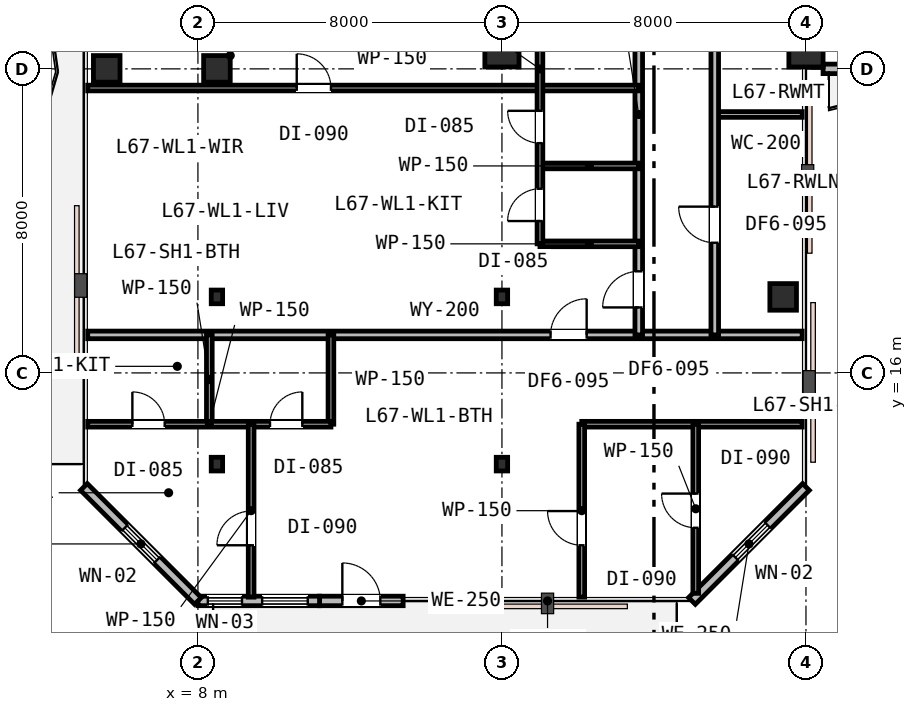
"""IFC4 building model, lengths in metres.
Left out: names, types, materials, properties, quantities, classifications, styles, units other than length and angle.
Written with IfcOpenShell. Run it as: python <this file> out.ifc"""

import sys

from ifc_helpers import new_model, si_unit, direction, frame, frame_2d, origin, origin_2d, place, context, subcontext, project, spatial, rectangle, i_section, extrude, element, fill, save


model = new_model("IFC4")
c1 = context("Model", 3, precision=1e-05, world=origin(), true_north=direction((0.0, 1.0)))
c2 = subcontext(c1, "Body", "Model", "MODEL_VIEW")
j1 = project(units=[si_unit("LENGTHUNIT", "METRE"), si_unit("PLANEANGLEUNIT", "RADIAN")], contexts=[c1])
p1 = place(None, origin())
s1 = spatial("IfcSite", under=j1, at=p1, CompositionType="ELEMENT")
p2 = place(p1, origin())
s2 = spatial("IfcBuilding", under=s1, at=p2, CompositionType="ELEMENT")
p3 = place(p2, frame((0.0, 0.0, 260.2)))
s3 = spatial("IfcBuildingStorey", under=s2, at=p3, CompositionType="ELEMENT", Elevation=260.2)
p4 = place(p3, frame((8.5, 24.0, 0.0), z_axis=(0.0, 0.0, 1.0), x_axis=(1.0, 0.0, 0.0)))
e1 = element("IfcColumn", 1, at=p4, inside=s3, PredefinedType="COLUMN", context=c2, shape_type="SweptSolid", body=[
    extrude(rectangle(XDim=0.7, YDim=0.7, at=origin_2d()), origin(), (0.0, 0.0, 1.0), 3.8),
])
for number, where, z_axis, x_axis in (
    (2, (16.0, 24.5, 0.0), (0.0, 0.0, 1.0), (1.0, 0.0, 0.0)),
    (3, (24.0, 24.5, 0.0), (0.0, 0.0, 1.0), (1.0, 0.0, 0.0)),
):
    element("IfcColumn", number, at=place(p3, frame(where, z_axis=z_axis, x_axis=x_axis)), inside=s3, PredefinedType="COLUMN", context=c2, shape_type="SweptSolid", body=[
        extrude(rectangle(XDim=0.9, YDim=0.9, at=origin_2d()), origin(), (0.0, 0.0, 1.0), 3.8),
    ])
for number, where, z_axis, x_axis in (
    (4, (5.6, 24.0, 0.0), (0.0, 0.0, 1.0), (1.0, 0.0, 0.0)),
    (5, (23.4, 18.0, 0.0), (0.0, 0.0, 1.0), (1.0, 0.0, 0.0)),
):
    element("IfcColumn", number, at=place(p3, frame(where, z_axis=z_axis, x_axis=x_axis)), inside=s3, PredefinedType="COLUMN", context=c2, shape_type="SweptSolid", body=[
        extrude(rectangle(XDim=0.7, YDim=0.7, at=origin_2d()), origin(), (0.0, 0.0, 1.0), 3.8),
    ])
for number, where, z_axis, x_axis in (
    (6, (8.5, 13.6, 0.0), (0.0, 0.0, 1.0), (1.0, 0.0, 0.0)),
    (7, (16.0, 13.6, 0.0), (0.0, 0.0, 1.0), (1.0, 0.0, 0.0)),
    (8, (8.5, 18.0, 0.0), (0.0, 0.0, 1.0), (1.0, 0.0, 0.0)),
    (9, (16.0, 18.0, 0.0), (0.0, 0.0, 1.0), (1.0, 0.0, 0.0)),
):
    element("IfcColumn", number, at=place(p3, frame(where, z_axis=z_axis, x_axis=x_axis)), inside=s3, PredefinedType="COLUMN", context=c2, shape_type="SweptSolid", body=[
        extrude(i_section(OverallWidth=0.3, OverallDepth=0.36, WebThickness=0.013, FlangeThickness=0.022, FilletRadius=0.027, at=origin_2d()), origin(), (0.0, 0.0, 1.0), 3.8),
    ])
p5 = place(p3, frame((11.2, 10.0, 0.0), z_axis=(0.0, 0.0, 1.0), x_axis=(1.0, 0.0, 0.0)))
e10 = element("IfcWall", 10, at=p5, inside=s3, PredefinedType="STANDARD", context=c2, shape_type="SweptSolid", body=[
    extrude(rectangle(XDim=2.2, YDim=0.25, at=frame_2d((1.1, 0.0))), origin(), (0.0, 0.0, 1.0), 3.53),
])
p6 = place(p5, frame((0.6, 0.0, 0.0)))
e11 = element("IfcOpeningElement", 11, at=p6, cuts=e10, PredefinedType="OPENING", context=c2, shape_type="SweptSolid", body=[
    extrude(rectangle(XDim=1.0, YDim=2.15, at=frame_2d((0.5, 1.075))), frame((0.0, 0.135, 0.0), z_axis=(0.0, -1.0, 0.0), x_axis=(1.0, 0.0, 0.0)), (0.0, 0.0, 1.0), 0.27),
])
p7 = place(p3, frame((8.0, 10.0, 0.0), z_axis=(0.0, 0.0, 1.0), x_axis=(1.0, 0.0, 0.0)))
e12 = element("IfcWall", 12, at=p7, inside=s3, PredefinedType="STANDARD", context=c2, shape_type="SweptSolid", body=[
    extrude(rectangle(XDim=3.2, YDim=0.25, at=frame_2d((1.6, 0.0))), origin(), (0.0, 0.0, 1.0), 3.53),
])
p8 = place(p7, frame((0.26, 0.0, 0.9)))
e13 = element("IfcOpeningElement", 13, at=p8, cuts=e12, PredefinedType="OPENING", context=c2, shape_type="SweptSolid", body=[
    extrude(rectangle(XDim=0.9, YDim=1.55, at=frame_2d((0.45, 0.775))), frame((0.0, 0.135, 0.0), z_axis=(0.0, -1.0, 0.0), x_axis=(1.0, 0.0, 0.0)), (0.0, 0.0, 1.0), 0.27),
])
p9 = place(p7, frame((1.69, 0.0, 0.85)))
e14 = element("IfcOpeningElement", 14, at=p9, cuts=e12, PredefinedType="OPENING", context=c2, shape_type="SweptSolid", body=[
    extrude(rectangle(XDim=1.2, YDim=1.6, at=frame_2d((0.6, 0.8))), frame((0.0, 0.135, 0.0), z_axis=(0.0, -1.0, 0.0), x_axis=(1.0, 0.0, 0.0)), (0.0, 0.0, 1.0), 0.27),
])
p10 = place(p3, frame((21.0, 10.0, 0.0), z_axis=(0.0, 0.0, 1.0), x_axis=(0.707106781187, 0.707106781187, 0.0)))
e15 = element("IfcWall", 15, at=p10, inside=s3, PredefinedType="STANDARD", context=c2, shape_type="SweptSolid", body=[
    extrude(rectangle(XDim=4.243, YDim=0.25, at=frame_2d((2.121, 0.0))), origin(), (0.0, 0.0, 1.0), 3.53),
])
p11 = place(p10, frame((1.617, 0.0, 0.85)))
e16 = element("IfcOpeningElement", 16, at=p11, cuts=e15, PredefinedType="OPENING", context=c2, shape_type="SweptSolid", body=[
    extrude(rectangle(XDim=1.2, YDim=1.6, at=frame_2d((0.6, 0.8))), frame((0.0, 0.135, 0.0), z_axis=(0.0, -1.0, 0.0), x_axis=(1.0, 0.0, 0.0)), (0.0, 0.0, 1.0), 0.27),
])
p12 = place(p3, frame((24.45, 24.0, 0.0), z_axis=(0.0, 0.0, 1.0), x_axis=(1.0, 0.0, 0.0)))
e17 = element("IfcWall", 17, at=p12, inside=s3, PredefinedType="STANDARD", context=c2, shape_type="SweptSolid", body=[
    extrude(rectangle(XDim=0.95, YDim=0.25, at=frame_2d((0.475, 0.0))), origin(), (0.0, 0.0, 1.0), 3.27),
])
p13 = place(p3, frame((5.0, 13.0, 0.0), z_axis=(0.0, 0.0, 1.0), x_axis=(0.707106781187, -0.707106781187, 0.0)))
e18 = element("IfcWall", 18, at=p13, inside=s3, PredefinedType="STANDARD", context=c2, shape_type="SweptSolid", body=[
    extrude(rectangle(XDim=4.243, YDim=0.25, at=frame_2d((2.121, 0.0))), origin(), (0.0, 0.0, 1.0), 3.53),
])
p14 = place(p13, frame((1.521, 0.0, 0.85)))
e19 = element("IfcOpeningElement", 19, at=p14, cuts=e18, PredefinedType="OPENING", context=c2, shape_type="SweptSolid", body=[
    extrude(rectangle(XDim=1.2, YDim=1.6, at=frame_2d((0.6, 0.8))), frame((0.0, 0.135, 0.0), z_axis=(0.0, -1.0, 0.0), x_axis=(1.0, 0.0, 0.0)), (0.0, 0.0, 1.0), 0.27),
])
p15 = place(p3, frame((5.1, 17.0, 0.0), z_axis=(0.0, 0.0, 1.0), x_axis=(1.0, 0.0, 0.0)))
e20 = element("IfcWall", 20, at=p15, inside=s3, PredefinedType="PARTITIONING", context=c2, shape_type="SweptSolid", body=[
    extrude(rectangle(XDim=18.8, YDim=0.2, at=frame_2d((9.4, 0.0))), origin(), (0.0, 0.0, 1.0), 3.16),
])
p16 = place(p15, frame((12.179, 0.0, 0.0)))
e21 = element("IfcOpeningElement", 21, at=p16, cuts=e20, PredefinedType="OPENING", context=c2, shape_type="SweptSolid", body=[
    extrude(rectangle(XDim=0.95, YDim=2.15, at=frame_2d((0.475, 1.075))), frame((0.0, 0.11, 0.0), z_axis=(0.0, -1.0, 0.0), x_axis=(1.0, 0.0, 0.0)), (0.0, 0.0, 1.0), 0.22),
])
p17 = place(p3, frame((19.6, 17.0, 0.0), z_axis=(0.0, 0.0, 1.0), x_axis=(0.0, 1.0, 0.0)))
e22 = element("IfcWall", 22, at=p17, inside=s3, PredefinedType="PARTITIONING", context=c2, shape_type="SweptSolid", body=[
    extrude(rectangle(XDim=11.6, YDim=0.2, at=frame_2d((5.8, 0.0))), origin(), (0.0, 0.0, 1.0), 3.16),
])
p18 = place(p17, frame((0.723, 0.0, 0.0)))
e23 = element("IfcOpeningElement", 23, at=p18, cuts=e22, PredefinedType="OPENING", context=c2, shape_type="SweptSolid", body=[
    extrude(rectangle(XDim=0.95, YDim=2.15, at=frame_2d((0.475, 1.075))), frame((0.0, 0.11, 0.0), z_axis=(0.0, -1.0, 0.0), x_axis=(1.0, 0.0, 0.0)), (0.0, 0.0, 1.0), 0.22),
])
for number, where, z_axis, x_axis in (
    (24, (17.0, 19.396, 0.0), (0.0, 0.0, 1.0), (1.0, 0.0, 0.0)),
    (25, (17.0, 21.446, 0.0), (0.0, 0.0, 1.0), (1.0, 0.0, 0.0)),
):
    element("IfcWall", number, at=place(p3, frame(where, z_axis=z_axis, x_axis=x_axis)), inside=s3, PredefinedType="PARTITIONING", context=c2, shape_type="SweptSolid", body=[
        extrude(rectangle(XDim=2.6, YDim=0.15, at=frame_2d((1.3, 0.0))), origin(), (0.0, 0.0, 1.0), 3.53),
    ])
p19 = place(p3, frame((5.1, 23.496, 0.0), z_axis=(0.0, 0.0, 1.0), x_axis=(1.0, 0.0, 0.0)))
e26 = element("IfcWall", 26, at=p19, inside=s3, PredefinedType="PARTITIONING", context=c2, shape_type="SweptSolid", body=[
    extrude(rectangle(XDim=14.5, YDim=0.15, at=frame_2d((7.25, 0.0))), origin(), (0.0, 0.0, 1.0), 3.16),
])
p20 = place(p19, frame((5.5, 0.0, 0.0)))
e27 = element("IfcOpeningElement", 27, at=p20, cuts=e26, PredefinedType="OPENING", context=c2, shape_type="SweptSolid", body=[
    extrude(rectangle(XDim=0.9, YDim=2.15, at=frame_2d((0.45, 1.075))), frame((0.0, 0.085, 0.0), z_axis=(0.0, -1.0, 0.0), x_axis=(1.0, 0.0, 0.0)), (0.0, 0.0, 1.0), 0.17),
])
p21 = place(p3, frame((17.0, 19.396, 0.0), z_axis=(0.0, 0.0, 1.0), x_axis=(0.0, 1.0, 0.0)))
e28 = element("IfcWall", 28, at=p21, inside=s3, PredefinedType="PARTITIONING", context=c2, shape_type="SweptSolid", body=[
    extrude(rectangle(XDim=9.204, YDim=0.15, at=frame_2d((4.602, 0.0))), origin(), (0.0, 0.0, 1.0), 3.16),
])
p22 = place(p21, frame((0.6, 0.0, 0.0)))
e29 = element("IfcOpeningElement", 29, at=p22, cuts=e28, PredefinedType="OPENING", context=c2, shape_type="SweptSolid", body=[
    extrude(rectangle(XDim=0.85, YDim=2.15, at=frame_2d((0.425, 1.075))), frame((0.0, 0.085, 0.0), z_axis=(0.0, -1.0, 0.0), x_axis=(1.0, 0.0, 0.0)), (0.0, 0.0, 1.0), 0.17),
])
p23 = place(p21, frame((2.65, 0.0, 0.0)))
e30 = element("IfcOpeningElement", 30, at=p23, cuts=e28, PredefinedType="OPENING", context=c2, shape_type="SweptSolid", body=[
    extrude(rectangle(XDim=0.85, YDim=2.15, at=frame_2d((0.425, 1.075))), frame((0.0, 0.085, 0.0), z_axis=(0.0, -1.0, 0.0), x_axis=(1.0, 0.0, 0.0)), (0.0, 0.0, 1.0), 0.17),
])
p24 = place(p21, frame((6.593, 0.0, 0.0)))
e31 = element("IfcOpeningElement", 31, at=p24, cuts=e28, PredefinedType="OPENING", context=c2, shape_type="SweptSolid", body=[
    extrude(rectangle(XDim=0.85, YDim=2.15, at=frame_2d((0.425, 1.075))), frame((0.0, 0.085, 0.0), z_axis=(0.0, -1.0, 0.0), x_axis=(1.0, 0.0, 0.0)), (0.0, 0.0, 1.0), 0.17),
])
p25 = place(p3, frame((21.6, 22.8, 0.0), z_axis=(0.0, 0.0, 1.0), x_axis=(1.0, 0.0, 0.0)))
e32 = element("IfcWall", 32, at=p25, inside=s3, PredefinedType="PARTITIONING", context=c2, shape_type="SweptSolid", body=[
    extrude(rectangle(XDim=2.3, YDim=0.15, at=frame_2d((1.15, 0.0))), origin(), (0.0, 0.0, 1.0), 3.53),
])
p26 = place(p3, frame((21.6, 17.0, 0.0), z_axis=(0.0, 0.0, 1.0), x_axis=(0.0, 1.0, 0.0)))
e33 = element("IfcWall", 33, at=p26, inside=s3, PredefinedType="PARTITIONING", context=c2, shape_type="SweptSolid", body=[
    extrude(rectangle(XDim=11.6, YDim=0.2, at=frame_2d((5.8, 0.0))), origin(), (0.0, 0.0, 1.0), 3.16),
])
p27 = place(p26, frame((8.994, 0.0, 0.0)))
e34 = element("IfcOpeningElement", 34, at=p27, cuts=e33, PredefinedType="OPENING", context=c2, shape_type="SweptSolid", body=[
    extrude(rectangle(XDim=0.95, YDim=2.15, at=frame_2d((0.475, 1.075))), frame((0.0, 0.11, 0.0), z_axis=(0.0, -1.0, 0.0), x_axis=(1.0, 0.0, 0.0)), (0.0, 0.0, 1.0), 0.22),
])
p28 = place(p26, frame((2.425, 0.0, 0.0)))
e35 = element("IfcOpeningElement", 35, at=p28, cuts=e33, PredefinedType="OPENING", context=c2, shape_type="SweptSolid", body=[
    extrude(rectangle(XDim=0.95, YDim=2.15, at=frame_2d((0.475, 1.075))), frame((0.0, 0.11, 0.0), z_axis=(0.0, -1.0, 0.0), x_axis=(1.0, 0.0, 0.0)), (0.0, 0.0, 1.0), 0.22),
])
for number, where, z_axis, x_axis in (
    (36, (11.5, 14.65, 0.0), (0.0, 0.0, 1.0), (0.0, 1.0, 0.0)),
    (37, (8.3, 14.65, 0.0), (0.0, 0.0, 1.0), (0.0, 1.0, 0.0)),
):
    element("IfcWall", number, at=place(p3, frame(where, z_axis=z_axis, x_axis=x_axis)), inside=s3, PredefinedType="PARTITIONING", context=c2, shape_type="SweptSolid", body=[
        extrude(rectangle(XDim=2.35, YDim=0.15, at=frame_2d((1.175, 0.0))), origin(), (0.0, 0.0, 1.0), 3.53),
    ])
p29 = place(p3, frame((5.1, 14.65, 0.0), z_axis=(0.0, 0.0, 1.0), x_axis=(1.0, 0.0, 0.0)))
e38 = element("IfcWall", 38, at=p29, inside=s3, PredefinedType="PARTITIONING", context=c2, shape_type="SweptSolid", body=[
    extrude(rectangle(XDim=6.4, YDim=0.15, at=frame_2d((3.2, 0.0))), origin(), (0.0, 0.0, 1.0), 3.53),
])
p30 = place(p29, frame((1.175, 0.0, 0.0)))
e39 = element("IfcOpeningElement", 39, at=p30, cuts=e38, PredefinedType="OPENING", context=c2, shape_type="SweptSolid", body=[
    extrude(rectangle(XDim=0.85, YDim=2.15, at=frame_2d((0.425, 1.075))), frame((0.0, 0.085, 0.0), z_axis=(0.0, -1.0, 0.0), x_axis=(1.0, 0.0, 0.0)), (0.0, 0.0, 1.0), 0.17),
])
p31 = place(p29, frame((4.797, 0.0, 0.0)))
e40 = element("IfcOpeningElement", 40, at=p31, cuts=e38, PredefinedType="OPENING", context=c2, shape_type="SweptSolid", body=[
    extrude(rectangle(XDim=0.85, YDim=2.15, at=frame_2d((0.425, 1.075))), frame((0.0, 0.085, 0.0), z_axis=(0.0, -1.0, 0.0), x_axis=(1.0, 0.0, 0.0)), (0.0, 0.0, 1.0), 0.17),
])
p32 = place(p3, frame((18.1, 14.65, 0.0), z_axis=(0.0, 0.0, 1.0), x_axis=(1.0, 0.0, 0.0)))
e41 = element("IfcWall", 41, at=p32, inside=s3, PredefinedType="PARTITIONING", context=c2, shape_type="SweptSolid", body=[
    extrude(rectangle(XDim=5.8, YDim=0.15, at=frame_2d((2.9, 0.0))), origin(), (0.0, 0.0, 1.0), 3.53),
])
p33 = place(p3, frame((9.4, 10.1, 0.0), z_axis=(0.0, 0.0, 1.0), x_axis=(0.0, 1.0, 0.0)))
e42 = element("IfcWall", 42, at=p33, inside=s3, PredefinedType="PARTITIONING", context=c2, shape_type="SweptSolid", body=[
    extrude(rectangle(XDim=4.55, YDim=0.15, at=frame_2d((2.275, 0.0))), origin(), (0.0, 0.0, 1.0), 3.53),
])
p34 = place(p33, frame((1.365, 0.0, 0.0)))
e43 = element("IfcOpeningElement", 43, at=p34, cuts=e42, PredefinedType="OPENING", context=c2, shape_type="SweptSolid", body=[
    extrude(rectangle(XDim=0.9, YDim=2.15, at=frame_2d((0.45, 1.075))), frame((0.0, 0.085, 0.0), z_axis=(0.0, -1.0, 0.0), x_axis=(1.0, 0.0, 0.0)), (0.0, 0.0, 1.0), 0.17),
])
p35 = place(p3, frame((21.1, 10.2, 0.0), z_axis=(0.0, 0.0, 1.0), x_axis=(0.0, 1.0, 0.0)))
e44 = element("IfcWall", 44, at=p35, inside=s3, PredefinedType="PARTITIONING", context=c2, shape_type="SweptSolid", body=[
    extrude(rectangle(XDim=4.45, YDim=0.15, at=frame_2d((2.225, 0.0))), origin(), (0.0, 0.0, 1.0), 3.53),
])
p36 = place(p35, frame((1.725, 0.0, 0.0)))
e45 = element("IfcOpeningElement", 45, at=p36, cuts=e44, PredefinedType="OPENING", context=c2, shape_type="SweptSolid", body=[
    extrude(rectangle(XDim=0.9, YDim=2.15, at=frame_2d((0.45, 1.075))), frame((0.0, 0.085, 0.0), z_axis=(0.0, -1.0, 0.0), x_axis=(1.0, 0.0, 0.0)), (0.0, 0.0, 1.0), 0.17),
])
p37 = place(p3, frame((18.1, 10.1, 0.0), z_axis=(0.0, 0.0, 1.0), x_axis=(0.0, 1.0, 0.0)))
e46 = element("IfcWall", 46, at=p37, inside=s3, PredefinedType="PARTITIONING", context=c2, shape_type="SweptSolid", body=[
    extrude(rectangle(XDim=4.55, YDim=0.15, at=frame_2d((2.275, 0.0))), origin(), (0.0, 0.0, 1.0), 3.53),
])
p38 = place(p37, frame((1.365, 0.0, 0.0)))
e47 = element("IfcOpeningElement", 47, at=p38, cuts=e46, PredefinedType="OPENING", context=c2, shape_type="SweptSolid", body=[
    extrude(rectangle(XDim=0.9, YDim=2.15, at=frame_2d((0.45, 1.075))), frame((0.0, 0.085, 0.0), z_axis=(0.0, -1.0, 0.0), x_axis=(1.0, 0.0, 0.0)), (0.0, 0.0, 1.0), 0.17),
])
p39 = place(p6, origin())
e48 = element("IfcDoor", 48, at=p39, inside=s3, OperationType="SINGLE_SWING_LEFT", PredefinedType="DOOR", context=c2, shape_type="SweptSolid", body=[
    extrude(rectangle(XDim=1.0, YDim=2.15, at=frame_2d((0.5, 1.075))), frame((0.0, 0.025, 0.0), z_axis=(0.0, -1.0, 0.0), x_axis=(1.0, 0.0, 0.0)), (0.0, 0.0, 1.0), 0.05),
])
fill(e11, e48)
p40 = place(p8, origin())
e49 = element("IfcWindow", 49, at=p40, inside=s3, PartitioningType="SINGLE_PANEL", PredefinedType="WINDOW", context=c2, shape_type="SweptSolid", body=[
    extrude(rectangle(XDim=0.9, YDim=1.55, at=frame_2d((0.45, 0.775))), frame((0.0, 0.03, 0.0), z_axis=(0.0, -1.0, 0.0), x_axis=(1.0, 0.0, 0.0)), (0.0, 0.0, 1.0), 0.06),
])
fill(e13, e49)
p41 = place(p9, origin())
e50 = element("IfcWindow", 50, at=p41, inside=s3, PartitioningType="SINGLE_PANEL", PredefinedType="WINDOW", context=c2, shape_type="SweptSolid", body=[
    extrude(rectangle(XDim=1.2, YDim=1.6, at=frame_2d((0.6, 0.8))), frame((0.0, 0.03, 0.0), z_axis=(0.0, -1.0, 0.0), x_axis=(1.0, 0.0, 0.0)), (0.0, 0.0, 1.0), 0.06),
])
fill(e14, e50)
p42 = place(p11, origin())
e51 = element("IfcWindow", 51, at=p42, inside=s3, PartitioningType="SINGLE_PANEL", PredefinedType="WINDOW", context=c2, shape_type="SweptSolid", body=[
    extrude(rectangle(XDim=1.2, YDim=1.6, at=frame_2d((0.6, 0.8))), frame((0.0, 0.03, 0.0), z_axis=(0.0, -1.0, 0.0), x_axis=(1.0, 0.0, 0.0)), (0.0, 0.0, 1.0), 0.06),
])
fill(e16, e51)
p43 = place(p14, origin())
e52 = element("IfcWindow", 52, at=p43, inside=s3, PartitioningType="SINGLE_PANEL", PredefinedType="WINDOW", context=c2, shape_type="SweptSolid", body=[
    extrude(rectangle(XDim=1.2, YDim=1.6, at=frame_2d((0.6, 0.8))), frame((0.0, 0.03, 0.0), z_axis=(0.0, -1.0, 0.0), x_axis=(1.0, 0.0, 0.0)), (0.0, 0.0, 1.0), 0.06),
])
fill(e19, e52)
p44 = place(p18, origin())
e53 = element("IfcDoor", 53, at=p44, inside=s3, OperationType="SINGLE_SWING_LEFT", PredefinedType="DOOR", context=c2, shape_type="SweptSolid", body=[
    extrude(rectangle(XDim=0.95, YDim=2.15, at=frame_2d((0.475, 1.075))), frame((0.0, 0.025, 0.0), z_axis=(0.0, -1.0, 0.0), x_axis=(1.0, 0.0, 0.0)), (0.0, 0.0, 1.0), 0.05),
])
fill(e23, e53)
p45 = place(p22, origin())
e54 = element("IfcDoor", 54, at=p45, inside=s3, OperationType="SINGLE_SWING_LEFT", PredefinedType="DOOR", context=c2, shape_type="SweptSolid", body=[
    extrude(rectangle(XDim=0.85, YDim=2.15, at=frame_2d((0.425, 1.075))), frame((0.0, 0.025, 0.0), z_axis=(0.0, -1.0, 0.0), x_axis=(1.0, 0.0, 0.0)), (0.0, 0.0, 1.0), 0.05),
])
fill(e29, e54)
p46 = place(p23, origin())
e55 = element("IfcDoor", 55, at=p46, inside=s3, OperationType="SINGLE_SWING_RIGHT", PredefinedType="DOOR", context=c2, shape_type="SweptSolid", body=[
    extrude(rectangle(XDim=0.85, YDim=2.15, at=frame_2d((0.425, 1.075))), frame((0.0, 0.025, 0.0), z_axis=(0.0, -1.0, 0.0), x_axis=(1.0, 0.0, 0.0)), (0.0, 0.0, 1.0), 0.05),
])
fill(e30, e55)
p47 = place(p20, origin())
e56 = element("IfcDoor", 56, at=p47, inside=s3, OperationType="SINGLE_SWING_LEFT", PredefinedType="DOOR", context=c2, shape_type="SweptSolid", body=[
    extrude(rectangle(XDim=0.9, YDim=2.15, at=frame_2d((0.45, 1.075))), frame((0.0, 0.025, 0.0), z_axis=(0.0, -1.0, 0.0), x_axis=(1.0, 0.0, 0.0)), (0.0, 0.0, 1.0), 0.05),
])
fill(e27, e56)
p48 = place(p28, origin())
e57 = element("IfcDoor", 57, at=p48, inside=s3, OperationType="SINGLE_SWING_RIGHT", PredefinedType="DOOR", context=c2, shape_type="SweptSolid", body=[
    extrude(rectangle(XDim=0.95, YDim=2.15, at=frame_2d((0.475, 1.075))), frame((0.0, 0.025, 0.0), z_axis=(0.0, -1.0, 0.0), x_axis=(1.0, 0.0, 0.0)), (0.0, 0.0, 1.0), 0.05),
])
fill(e35, e57)
p49 = place(p16, origin())
e58 = element("IfcDoor", 58, at=p49, inside=s3, OperationType="SINGLE_SWING_RIGHT", PredefinedType="DOOR", context=c2, shape_type="SweptSolid", body=[
    extrude(rectangle(XDim=0.95, YDim=2.15, at=frame_2d((0.475, 1.075))), frame((0.0, 0.025, 0.0), z_axis=(0.0, -1.0, 0.0), x_axis=(1.0, 0.0, 0.0)), (0.0, 0.0, 1.0), 0.05),
])
fill(e21, e58)
p50 = place(p30, origin())
e59 = element("IfcDoor", 59, at=p50, inside=s3, OperationType="SINGLE_SWING_LEFT", PredefinedType="DOOR", context=c2, shape_type="SweptSolid", body=[
    extrude(rectangle(XDim=0.85, YDim=2.15, at=frame_2d((0.425, 1.075))), frame((0.0, 0.025, 0.0), z_axis=(0.0, -1.0, 0.0), x_axis=(1.0, 0.0, 0.0)), (0.0, 0.0, 1.0), 0.05),
])
fill(e39, e59)
p51 = place(p31, origin())
e60 = element("IfcDoor", 60, at=p51, inside=s3, OperationType="SINGLE_SWING_RIGHT", PredefinedType="DOOR", context=c2, shape_type="SweptSolid", body=[
    extrude(rectangle(XDim=0.85, YDim=2.15, at=frame_2d((0.425, 1.075))), frame((0.0, 0.025, 0.0), z_axis=(0.0, -1.0, 0.0), x_axis=(1.0, 0.0, 0.0)), (0.0, 0.0, 1.0), 0.05),
])
fill(e40, e60)
p52 = place(p34, origin())
e61 = element("IfcDoor", 61, at=p52, inside=s3, OperationType="SINGLE_SWING_LEFT", PredefinedType="DOOR", context=c2, shape_type="SweptSolid", body=[
    extrude(rectangle(XDim=0.9, YDim=2.15, at=frame_2d((0.45, 1.075))), frame((0.0, 0.025, 0.0), z_axis=(0.0, -1.0, 0.0), x_axis=(1.0, 0.0, 0.0)), (0.0, 0.0, 1.0), 0.05),
])
fill(e43, e61)
p53 = place(p36, origin())
e62 = element("IfcDoor", 62, at=p53, inside=s3, OperationType="SINGLE_SWING_RIGHT", PredefinedType="DOOR", context=c2, shape_type="SweptSolid", body=[
    extrude(rectangle(XDim=0.9, YDim=2.15, at=frame_2d((0.45, 1.075))), frame((0.0, 0.025, 0.0), z_axis=(0.0, -1.0, 0.0), x_axis=(1.0, 0.0, 0.0)), (0.0, 0.0, 1.0), 0.05),
])
fill(e45, e62)
p54 = place(p38, origin())
e63 = element("IfcDoor", 63, at=p54, inside=s3, OperationType="SINGLE_SWING_RIGHT", PredefinedType="DOOR", context=c2, shape_type="SweptSolid", body=[
    extrude(rectangle(XDim=0.9, YDim=2.15, at=frame_2d((0.45, 1.075))), frame((0.0, 0.025, 0.0), z_axis=(0.0, -1.0, 0.0), x_axis=(1.0, 0.0, 0.0)), (0.0, 0.0, 1.0), 0.05),
])
fill(e47, e63)
save(model, sys.argv[1])
